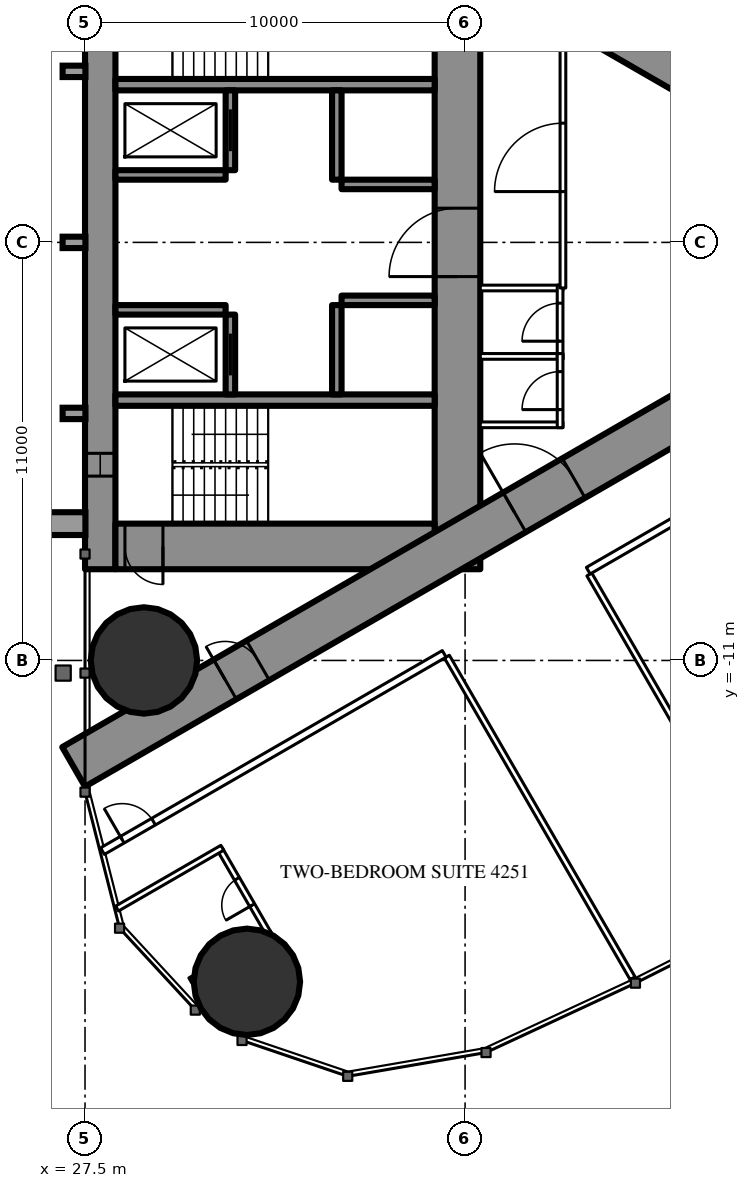
"""IFC4 building model, lengths in metres.
Left out: names, types, materials, properties, quantities, classifications, styles, units other than length and angle.
Written with IfcOpenShell. Run it as: python <this file> out.ifc"""

import sys

from ifc_helpers import new_model, si_unit, direction, frame, frame_2d, origin, origin_2d, place, context, subcontext, project, spatial, rectangle, circle, extrude, element, fill, save


model = new_model("IFC4")
c1 = context("Model", 3, precision=1e-05, world=origin(), true_north=direction((0.0, 1.0)))
c2 = subcontext(c1, "Body", "Model", "MODEL_VIEW")
j1 = project(units=[si_unit("LENGTHUNIT", "METRE"), si_unit("PLANEANGLEUNIT", "RADIAN")], contexts=[c1])
p1 = place(None, origin())
s1 = spatial("IfcSite", under=j1, at=p1, CompositionType="ELEMENT")
p2 = place(p1, origin())
s2 = spatial("IfcBuilding", under=s1, at=p2, CompositionType="ELEMENT")
p3 = place(p2, frame((0.0, 0.0, 159.8)))
s3 = spatial("IfcBuildingStorey", under=s2, at=p3, CompositionType="ELEMENT", Elevation=159.8)
for number, where, z_axis, x_axis in (
    (1, (31.76, -19.456, 0.0), (0.0, 0.0, 1.0), (1.0, 0.0, 0.0)),
    (2, (29.05, -11.0, 0.0), (0.0, 0.0, 1.0), (1.0, 0.0, 0.0)),
):
    element("IfcColumn", number, at=place(p3, frame(where, z_axis=z_axis, x_axis=x_axis)), inside=s3, PredefinedType="COLUMN", context=c2, shape_type="SweptSolid", body=[
        extrude(circle(Radius=1.4, at=origin_2d()), origin(), (0.0, 0.0, 1.0), 3.5),
    ])
p4 = place(p3, frame((27.9, -8.6, 0.0), z_axis=(0.0, 0.0, 1.0), x_axis=(0.0, 1.0, 0.0)))
e3 = element("IfcWall", 3, at=p4, inside=s3, PredefinedType="SHEAR", context=c2, shape_type="SweptSolid", body=[
    extrude(rectangle(XDim=17.2, YDim=0.8, at=frame_2d((8.6, 0.0))), origin(), (0.0, 0.0, 1.0), 3.5),
])
p5 = place(p4, frame((2.45, 0.0, 0.6)))
e4 = element("IfcOpeningElement", 4, at=p5, cuts=e3, PredefinedType="OPENING", context=c2, shape_type="SweptSolid", body=[
    extrude(rectangle(XDim=0.6, YDim=2.1, at=frame_2d((0.3, 1.05))), frame((0.0, 0.41, 0.0), z_axis=(0.0, -1.0, 0.0), x_axis=(1.0, 0.0, 0.0)), (0.0, 0.0, 1.0), 0.82),
])
p6 = place(p4, frame((14.15, 0.0, 0.6)))
e5 = element("IfcOpeningElement", 5, at=p6, cuts=e3, PredefinedType="OPENING", context=c2, shape_type="SweptSolid", body=[
    extrude(rectangle(XDim=0.6, YDim=2.1, at=frame_2d((0.3, 1.05))), frame((0.0, 0.41, 0.0), z_axis=(0.0, -1.0, 0.0), x_axis=(1.0, 0.0, 0.0)), (0.0, 0.0, 1.0), 0.82),
])
p7 = place(p3, frame((37.3, -8.6, 0.0), z_axis=(0.0, 0.0, 1.0), x_axis=(0.0, 1.0, 0.0)))
e6 = element("IfcWall", 6, at=p7, inside=s3, PredefinedType="SHEAR", context=c2, shape_type="SweptSolid", body=[
    extrude(rectangle(XDim=17.2, YDim=1.2, at=frame_2d((8.6, 0.0))), origin(), (0.0, 0.0, 1.0), 3.5),
])
p8 = place(p7, frame((7.7, 0.0, 0.0)))
e7 = element("IfcOpeningElement", 7, at=p8, cuts=e6, PredefinedType="OPENING", context=c2, shape_type="SweptSolid", body=[
    extrude(rectangle(XDim=1.8, YDim=2.2, at=frame_2d((0.9, 1.1))), frame((0.0, 0.61, 0.0), z_axis=(0.0, -1.0, 0.0), x_axis=(1.0, 0.0, 0.0)), (0.0, 0.0, 1.0), 1.22),
])
p9 = place(p3, frame((28.3, -8.0, 0.0), z_axis=(0.0, 0.0, 1.0), x_axis=(1.0, 0.0, 0.0)))
e8 = element("IfcWall", 8, at=p9, inside=s3, PredefinedType="SHEAR", context=c2, shape_type="SweptSolid", body=[
    extrude(rectangle(XDim=8.4, YDim=1.2, at=frame_2d((4.2, 0.0))), origin(), (0.0, 0.0, 1.0), 3.5),
])
p10 = place(p9, frame((0.25, 0.0, 0.0)))
e9 = element("IfcOpeningElement", 9, at=p10, cuts=e8, PredefinedType="OPENING", context=c2, shape_type="SweptSolid", body=[
    extrude(rectangle(XDim=1.0, YDim=2.2, at=frame_2d((0.5, 1.1))), frame((0.0, 0.61, 0.0), z_axis=(0.0, -1.0, 0.0), x_axis=(1.0, 0.0, 0.0)), (0.0, 0.0, 1.0), 1.22),
])
for number, where, z_axis, x_axis in (
    (10, (28.3, -4.15, 0.0), (0.0, 0.0, 1.0), (1.0, 0.0, 0.0)),
    (11, (28.3, 4.15, 0.0), (0.0, 0.0, 1.0), (1.0, 0.0, 0.0)),
):
    element("IfcWall", number, at=place(p3, frame(where, z_axis=z_axis, x_axis=x_axis)), inside=s3, PredefinedType="SHEAR", context=c2, shape_type="SweptSolid", body=[
        extrude(rectangle(XDim=8.4, YDim=0.3, at=frame_2d((4.2, 0.0))), origin(), (0.0, 0.0, 1.0), 3.5),
    ])
p11 = place(p3, frame((31.325, -4.0, 0.0), z_axis=(0.0, 0.0, 1.0), x_axis=(0.0, 1.0, 0.0)))
e12 = element("IfcWall", 12, at=p11, inside=s3, PredefinedType="SHEAR", context=c2, shape_type="SweptSolid", body=[
    extrude(rectangle(XDim=2.1, YDim=0.25, at=frame_2d((1.05, 0.0))), origin(), (0.0, 0.0, 1.0), 3.5),
])
p12 = place(p11, frame((0.5, 0.0, 0.0)))
e13 = element("IfcOpeningElement", 13, at=p12, cuts=e12, PredefinedType="OPENING", context=c2, shape_type="SweptSolid", body=[
    extrude(rectangle(XDim=1.1, YDim=2.2, at=frame_2d((0.55, 1.1))), frame((0.0, 0.135, 0.0), z_axis=(0.0, -1.0, 0.0), x_axis=(1.0, 0.0, 0.0)), (0.0, 0.0, 1.0), 0.27),
])
p13 = place(p3, frame((34.125, -4.0, 0.0), z_axis=(0.0, 0.0, 1.0), x_axis=(0.0, 1.0, 0.0)))
e14 = element("IfcWall", 14, at=p13, inside=s3, PredefinedType="SHEAR", context=c2, shape_type="SweptSolid", body=[
    extrude(rectangle(XDim=2.35, YDim=0.25, at=frame_2d((1.175, 0.0))), origin(), (0.0, 0.0, 1.0), 3.5),
])
p14 = place(p3, frame((28.3, -1.775, 0.0), z_axis=(0.0, 0.0, 1.0), x_axis=(1.0, 0.0, 0.0)))
e15 = element("IfcWall", 15, at=p14, inside=s3, PredefinedType="SHEAR", context=c2, shape_type="SweptSolid", body=[
    extrude(rectangle(XDim=2.9, YDim=0.25, at=frame_2d((1.45, 0.0))), origin(), (0.0, 0.0, 1.0), 3.5),
])
p15 = place(p3, frame((34.25, -1.525, 0.0), z_axis=(0.0, 0.0, 1.0), x_axis=(1.0, 0.0, 0.0)))
e16 = element("IfcWall", 16, at=p15, inside=s3, PredefinedType="SHEAR", context=c2, shape_type="SweptSolid", body=[
    extrude(rectangle(XDim=2.45, YDim=0.25, at=frame_2d((1.225, 0.0))), origin(), (0.0, 0.0, 1.0), 3.5),
])
p16 = place(p3, frame((31.325, 1.9, 0.0), z_axis=(0.0, 0.0, 1.0), x_axis=(0.0, 1.0, 0.0)))
e17 = element("IfcWall", 17, at=p16, inside=s3, PredefinedType="SHEAR", context=c2, shape_type="SweptSolid", body=[
    extrude(rectangle(XDim=2.1, YDim=0.25, at=frame_2d((1.05, 0.0))), origin(), (0.0, 0.0, 1.0), 3.5),
])
p17 = place(p16, frame((0.5, 0.0, 0.0)))
e18 = element("IfcOpeningElement", 18, at=p17, cuts=e17, PredefinedType="OPENING", context=c2, shape_type="SweptSolid", body=[
    extrude(rectangle(XDim=1.1, YDim=2.2, at=frame_2d((0.55, 1.1))), frame((0.0, 0.135, 0.0), z_axis=(0.0, -1.0, 0.0), x_axis=(1.0, 0.0, 0.0)), (0.0, 0.0, 1.0), 0.27),
])
p18 = place(p3, frame((34.125, 1.65, 0.0), z_axis=(0.0, 0.0, 1.0), x_axis=(0.0, 1.0, 0.0)))
e19 = element("IfcWall", 19, at=p18, inside=s3, PredefinedType="SHEAR", context=c2, shape_type="SweptSolid", body=[
    extrude(rectangle(XDim=2.35, YDim=0.25, at=frame_2d((1.175, 0.0))), origin(), (0.0, 0.0, 1.0), 3.5),
])
p19 = place(p3, frame((28.3, 1.775, 0.0), z_axis=(0.0, 0.0, 1.0), x_axis=(1.0, 0.0, 0.0)))
e20 = element("IfcWall", 20, at=p19, inside=s3, PredefinedType="SHEAR", context=c2, shape_type="SweptSolid", body=[
    extrude(rectangle(XDim=2.9, YDim=0.25, at=frame_2d((1.45, 0.0))), origin(), (0.0, 0.0, 1.0), 3.5),
])
p20 = place(p3, frame((34.25, 1.525, 0.0), z_axis=(0.0, 0.0, 1.0), x_axis=(1.0, 0.0, 0.0)))
e21 = element("IfcWall", 21, at=p20, inside=s3, PredefinedType="SHEAR", context=c2, shape_type="SweptSolid", body=[
    extrude(rectangle(XDim=2.45, YDim=0.25, at=frame_2d((1.225, 0.0))), origin(), (0.0, 0.0, 1.0), 3.5),
])
p21 = place(p3, frame((27.2, -13.8, 0.0), z_axis=(0.0, 0.0, 1.0), x_axis=(0.866027159892, 0.499996958321, 0.0)))
e22 = element("IfcWall", 22, at=p21, inside=s3, PredefinedType="SHEAR", context=c2, shape_type="SweptSolid", body=[
    extrude(rectangle(XDim=27.947, YDim=1.2, at=frame_2d((13.973, 0.0))), origin(), (0.0, 0.0, 1.0), 3.5),
])
p22 = place(p21, frame((4.6, 0.0, 0.0)))
e23 = element("IfcOpeningElement", 23, at=p22, cuts=e22, PredefinedType="OPENING", context=c2, shape_type="SweptSolid", body=[
    extrude(rectangle(XDim=1.0, YDim=2.2, at=frame_2d((0.5, 1.1))), frame((0.0, 0.61, 0.0), z_axis=(0.0, -1.0, 0.0), x_axis=(1.0, 0.0, 0.0)), (0.0, 0.0, 1.0), 1.22),
])
p23 = place(p21, frame((13.395, 0.0, 0.0)))
e24 = element("IfcOpeningElement", 24, at=p23, cuts=e22, PredefinedType="OPENING", context=c2, shape_type="SweptSolid", body=[
    extrude(rectangle(XDim=1.8, YDim=2.2, at=frame_2d((0.9, 1.1))), frame((0.0, 0.61, 0.0), z_axis=(0.0, -1.0, 0.0), x_axis=(1.0, 0.0, 0.0)), (0.0, 0.0, 1.0), 1.22),
])
p24 = place(p3, frame((27.2, 13.8, 0.0), z_axis=(0.0, 0.0, 1.0), x_axis=(0.866024515034, -0.500001539357, 0.0)))
e25 = element("IfcWall", 25, at=p24, inside=s3, PredefinedType="SHEAR", context=c2, shape_type="SweptSolid", body=[
    extrude(rectangle(XDim=26.907, YDim=1.2, at=frame_2d((13.454, 0.0))), origin(), (0.0, 0.0, 1.0), 3.5),
])
p25 = place(p24, frame((4.6, 0.0, 0.0)))
e26 = element("IfcOpeningElement", 26, at=p25, cuts=e25, PredefinedType="OPENING", context=c2, shape_type="SweptSolid", body=[
    extrude(rectangle(XDim=1.0, YDim=2.2, at=frame_2d((0.5, 1.1))), frame((0.0, 0.61, 0.0), z_axis=(0.0, -1.0, 0.0), x_axis=(1.0, 0.0, 0.0)), (0.0, 0.0, 1.0), 1.22),
])
p26 = place(p24, frame((13.395, 0.0, 0.0)))
e27 = element("IfcOpeningElement", 27, at=p26, cuts=e25, PredefinedType="OPENING", context=c2, shape_type="SweptSolid", body=[
    extrude(rectangle(XDim=1.8, YDim=2.2, at=frame_2d((0.9, 1.1))), frame((0.0, 0.61, 0.0), z_axis=(0.0, -1.0, 0.0), x_axis=(1.0, 0.0, 0.0)), (0.0, 0.0, 1.0), 1.22),
])
p27 = place(p3, frame((37.022, -10.9, 0.0), z_axis=(0.0, 0.0, 1.0), x_axis=(0.499998620953, -0.866026199976, 0.0)))
e28 = element("IfcWall", 28, at=p27, inside=s3, PredefinedType="PARTITIONING", context=c2, shape_type="SweptSolid", body=[
    extrude(rectangle(XDim=9.77, YDim=0.15, at=frame_2d((4.885, 0.0))), origin(), (0.0, 0.0, 1.0), 3.25),
])
p28 = place(p3, frame((40.769, -8.737, 0.0), z_axis=(0.0, 0.0, 1.0), x_axis=(0.500013115284, -0.866017831539, 0.0)))
e29 = element("IfcWall", 29, at=p28, inside=s3, PredefinedType="PARTITIONING", context=c2, shape_type="SweptSolid", body=[
    extrude(rectangle(XDim=7.198, YDim=0.15, at=frame_2d((3.599, 0.0))), origin(), (0.0, 0.0, 1.0), 2.3),
])
p29 = place(p3, frame((27.959, -16.017, 0.0), z_axis=(0.0, 0.0, 1.0), x_axis=(0.866026201739, 0.499998617899, 0.0)))
e30 = element("IfcWall", 30, at=p29, inside=s3, PredefinedType="PARTITIONING", context=c2, shape_type="SweptSolid", body=[
    extrude(rectangle(XDim=10.382, YDim=0.2, at=frame_2d((5.191, 0.0))), origin(), (0.0, 0.0, 1.0), 3.25),
])
p30 = place(p29, frame((0.6, 0.0, 0.0)))
e31 = element("IfcOpeningElement", 31, at=p30, cuts=e30, PredefinedType="OPENING", context=c2, shape_type="SweptSolid", body=[
    extrude(rectangle(XDim=0.95, YDim=2.2, at=frame_2d((0.475, 1.1))), frame((0.0, 0.11, 0.0), z_axis=(0.0, -1.0, 0.0), x_axis=(1.0, 0.0, 0.0)), (0.0, 0.0, 1.0), 0.22),
])
p31 = place(p3, frame((40.741, -8.638, 0.0), z_axis=(0.0, 0.0, 1.0), x_axis=(0.866022967338, 0.500004220025, 0.0)))
e32 = element("IfcWall", 32, at=p31, inside=s3, PredefinedType="PARTITIONING", context=c2, shape_type="SweptSolid", body=[
    extrude(rectangle(XDim=17.276, YDim=0.2, at=frame_2d((8.638, 0.0))), origin(), (0.0, 0.0, 1.0), 3.25),
])
p32 = place(p31, frame((7.316, 0.0, 0.0)))
e33 = element("IfcOpeningElement", 33, at=p32, cuts=e32, PredefinedType="OPENING", context=c2, shape_type="SweptSolid", body=[
    extrude(rectangle(XDim=0.95, YDim=2.2, at=frame_2d((0.475, 1.1))), frame((0.0, 0.11, 0.0), z_axis=(0.0, -1.0, 0.0), x_axis=(1.0, 0.0, 0.0)), (0.0, 0.0, 1.0), 0.22),
])
p33 = place(p31, frame((11.366, 0.0, 0.0)))
e34 = element("IfcOpeningElement", 34, at=p33, cuts=e32, PredefinedType="OPENING", context=c2, shape_type="SweptSolid", body=[
    extrude(rectangle(XDim=0.95, YDim=2.2, at=frame_2d((0.475, 1.1))), frame((0.0, 0.11, 0.0), z_axis=(0.0, -1.0, 0.0), x_axis=(1.0, 0.0, 0.0)), (0.0, 0.0, 1.0), 0.22),
])
p34 = place(p31, frame((13.347, 0.0, 0.0)))
e35 = element("IfcOpeningElement", 35, at=p34, cuts=e32, PredefinedType="OPENING", context=c2, shape_type="SweptSolid", body=[
    extrude(rectangle(XDim=0.95, YDim=2.2, at=frame_2d((0.475, 1.1))), frame((0.0, 0.11, 0.0), z_axis=(0.0, -1.0, 0.0), x_axis=(1.0, 0.0, 0.0)), (0.0, 0.0, 1.0), 0.22),
])
p35 = place(p3, frame((30.269, -19.418, 0.0), z_axis=(0.0, 0.0, 1.0), x_axis=(0.866006523861, 0.500032699561, 0.0)))
e36 = element("IfcWall", 36, at=p35, inside=s3, PredefinedType="PARTITIONING", context=c2, shape_type="SweptSolid", body=[
    extrude(rectangle(XDim=2.475, YDim=0.15, at=frame_2d((1.237, 0.0))), origin(), (0.0, 0.0, 1.0), 3.25),
])
p36 = place(p3, frame((31.048, -15.966, 0.0), z_axis=(0.0, 0.0, 1.0), x_axis=(0.499936506574, -0.866062058628, 0.0)))
e37 = element("IfcWall", 37, at=p36, inside=s3, PredefinedType="PARTITIONING", context=c2, shape_type="SweptSolid", body=[
    extrude(rectangle(XDim=2.6, YDim=0.15, at=frame_2d((1.3, 0.0))), origin(), (0.0, 0.0, 1.0), 2.3),
])
p37 = place(p36, frame((0.9, 0.0, 0.0)))
e38 = element("IfcOpeningElement", 38, at=p37, cuts=e37, PredefinedType="OPENING", context=c2, shape_type="SweptSolid", body=[
    extrude(rectangle(XDim=0.8, YDim=2.2, at=frame_2d((0.4, 1.1))), frame((0.0, 0.085, 0.0), z_axis=(0.0, -1.0, 0.0), x_axis=(1.0, 0.0, 0.0)), (0.0, 0.0, 1.0), 0.17),
])
p38 = place(p3, frame((28.343, -17.528, 0.0), z_axis=(0.0, 0.0, 1.0), x_axis=(0.86600760081, 0.500030834389, 0.0)))
e39 = element("IfcWall", 39, at=p38, inside=s3, PredefinedType="PARTITIONING", context=c2, shape_type="SweptSolid", body=[
    extrude(rectangle(XDim=3.198, YDim=0.15, at=frame_2d((1.599, 0.0))), origin(), (0.0, 0.0, 1.0), 3.25),
])
for number, where, z_axis, x_axis in (
    (40, (37.9, -1.2, 0.0), (0.0, 0.0, 1.0), (1.0, 0.0, 0.0)),
    (41, (37.9, -3.0, 0.0), (0.0, 0.0, 1.0), (1.0, 0.0, 0.0)),
    (42, (37.9, -4.8, 0.0), (0.0, 0.0, 1.0), (1.0, 0.0, 0.0)),
):
    element("IfcWall", number, at=place(p3, frame(where, z_axis=z_axis, x_axis=x_axis)), inside=s3, PredefinedType="PARTITIONING", context=c2, shape_type="SweptSolid", body=[
        extrude(rectangle(XDim=2.175, YDim=0.15, at=frame_2d((1.087, 0.0))), origin(), (0.0, 0.0, 1.0), 3.25),
    ])
p39 = place(p3, frame((40.0, -3.075, 0.0), z_axis=(0.0, 0.0, 1.0), x_axis=(0.0, 1.0, 0.0)))
e43 = element("IfcWall", 43, at=p39, inside=s3, PredefinedType="PARTITIONING", context=c2, shape_type="SweptSolid", body=[
    extrude(rectangle(XDim=1.95, YDim=0.15, at=frame_2d((0.975, 0.0))), origin(), (0.0, 0.0, 1.0), 3.25),
])
p40 = place(p39, frame((0.475, 0.0, 0.0)))
e44 = element("IfcOpeningElement", 44, at=p40, cuts=e43, PredefinedType="OPENING", context=c2, shape_type="SweptSolid", body=[
    extrude(rectangle(XDim=1.0, YDim=2.2, at=frame_2d((0.5, 1.1))), frame((0.0, 0.085, 0.0), z_axis=(0.0, -1.0, 0.0), x_axis=(1.0, 0.0, 0.0)), (0.0, 0.0, 1.0), 0.17),
])
p41 = place(p3, frame((40.0, -4.875, 0.0), z_axis=(0.0, 0.0, 1.0), x_axis=(0.0, 1.0, 0.0)))
e45 = element("IfcWall", 45, at=p41, inside=s3, PredefinedType="PARTITIONING", context=c2, shape_type="SweptSolid", body=[
    extrude(rectangle(XDim=1.95, YDim=0.15, at=frame_2d((0.975, 0.0))), origin(), (0.0, 0.0, 1.0), 3.25),
])
p42 = place(p41, frame((0.475, 0.0, 0.0)))
e46 = element("IfcOpeningElement", 46, at=p42, cuts=e45, PredefinedType="OPENING", context=c2, shape_type="SweptSolid", body=[
    extrude(rectangle(XDim=1.0, YDim=2.2, at=frame_2d((0.5, 1.1))), frame((0.0, 0.085, 0.0), z_axis=(0.0, -1.0, 0.0), x_axis=(1.0, 0.0, 0.0)), (0.0, 0.0, 1.0), 0.17),
])
p43 = place(p3, frame((40.075, -1.2, 0.0), z_axis=(0.0, 0.0, 1.0), x_axis=(0.0, 1.0, 0.0)))
e47 = element("IfcWall", 47, at=p43, inside=s3, PredefinedType="PARTITIONING", context=c2, shape_type="SweptSolid", body=[
    extrude(rectangle(XDim=6.874, YDim=0.15, at=frame_2d((3.437, 0.0))), origin(), (0.0, 0.0, 1.0), 3.25),
])
p44 = place(p43, frame((2.537, 0.0, 0.0)))
e48 = element("IfcOpeningElement", 48, at=p44, cuts=e47, PredefinedType="OPENING", context=c2, shape_type="SweptSolid", body=[
    extrude(rectangle(XDim=1.8, YDim=2.2, at=frame_2d((0.9, 1.1))), frame((0.0, 0.085, 0.0), z_axis=(0.0, -1.0, 0.0), x_axis=(1.0, 0.0, 0.0)), (0.0, 0.0, 1.0), 0.17),
])
p45 = place(p37, origin())
e49 = element("IfcDoor", 49, at=p45, inside=s3, OperationType="SINGLE_SWING_RIGHT", PredefinedType="DOOR", context=c2, shape_type="SweptSolid", body=[
    extrude(rectangle(XDim=0.8, YDim=2.2, at=frame_2d((0.4, 1.1))), frame((0.0, 0.025, 0.0), z_axis=(0.0, -1.0, 0.0), x_axis=(1.0, 0.0, 0.0)), (0.0, 0.0, 1.0), 0.05),
])
fill(e38, e49)
p46 = place(p30, origin())
e50 = element("IfcDoor", 50, at=p46, inside=s3, OperationType="SINGLE_SWING_LEFT", PredefinedType="DOOR", context=c2, shape_type="SweptSolid", body=[
    extrude(rectangle(XDim=0.95, YDim=2.2, at=frame_2d((0.475, 1.1))), frame((0.0, 0.025, 0.0), z_axis=(0.0, -1.0, 0.0), x_axis=(1.0, 0.0, 0.0)), (0.0, 0.0, 1.0), 0.05),
])
fill(e31, e50)
p47 = place(p40, origin())
e51 = element("IfcDoor", 51, at=p47, inside=s3, OperationType="SINGLE_SWING_LEFT", PredefinedType="DOOR", context=c2, shape_type="SweptSolid", body=[
    extrude(rectangle(XDim=1.0, YDim=2.2, at=frame_2d((0.5, 1.1))), frame((0.0, 0.025, 0.0), z_axis=(0.0, -1.0, 0.0), x_axis=(1.0, 0.0, 0.0)), (0.0, 0.0, 1.0), 0.05),
])
fill(e44, e51)
p48 = place(p42, origin())
e52 = element("IfcDoor", 52, at=p48, inside=s3, OperationType="SINGLE_SWING_LEFT", PredefinedType="DOOR", context=c2, shape_type="SweptSolid", body=[
    extrude(rectangle(XDim=1.0, YDim=2.2, at=frame_2d((0.5, 1.1))), frame((0.0, 0.025, 0.0), z_axis=(0.0, -1.0, 0.0), x_axis=(1.0, 0.0, 0.0)), (0.0, 0.0, 1.0), 0.05),
])
fill(e46, e52)
p49 = place(p44, origin())
e53 = element("IfcDoor", 53, at=p49, inside=s3, OperationType="DOUBLE_DOOR_SINGLE_SWING", PredefinedType="DOOR", context=c2, shape_type="SweptSolid", body=[
    extrude(rectangle(XDim=1.8, YDim=2.2, at=frame_2d((0.9, 1.1))), frame((0.0, 0.025, 0.0), z_axis=(0.0, -1.0, 0.0), x_axis=(1.0, 0.0, 0.0)), (0.0, 0.0, 1.0), 0.05),
])
fill(e48, e53)
p50 = place(p22, origin())
e54 = element("IfcDoor", 54, at=p50, inside=s3, OperationType="SINGLE_SWING_LEFT", PredefinedType="DOOR", context=c2, shape_type="SweptSolid", body=[
    extrude(rectangle(XDim=1.0, YDim=2.2, at=frame_2d((0.5, 1.1))), frame((0.0, 0.025, 0.0), z_axis=(0.0, -1.0, 0.0), x_axis=(1.0, 0.0, 0.0)), (0.0, 0.0, 1.0), 0.05),
])
fill(e23, e54)
p51 = place(p23, origin())
e55 = element("IfcDoor", 55, at=p51, inside=s3, OperationType="DOUBLE_DOOR_SINGLE_SWING", PredefinedType="DOOR", context=c2, shape_type="SweptSolid", body=[
    extrude(rectangle(XDim=1.8, YDim=2.2, at=frame_2d((0.9, 1.1))), frame((0.0, 0.025, 0.0), z_axis=(0.0, -1.0, 0.0), x_axis=(1.0, 0.0, 0.0)), (0.0, 0.0, 1.0), 0.05),
])
fill(e24, e55)
p52 = place(p8, origin())
e56 = element("IfcDoor", 56, at=p52, inside=s3, OperationType="DOUBLE_DOOR_SINGLE_SWING", PredefinedType="DOOR", context=c2, shape_type="SweptSolid", body=[
    extrude(rectangle(XDim=1.8, YDim=2.2, at=frame_2d((0.9, 1.1))), frame((0.0, 0.025, 0.0), z_axis=(0.0, -1.0, 0.0), x_axis=(1.0, 0.0, 0.0)), (0.0, 0.0, 1.0), 0.05),
])
fill(e7, e56)
p53 = place(p10, origin())
e57 = element("IfcDoor", 57, at=p53, inside=s3, OperationType="SINGLE_SWING_RIGHT", PredefinedType="DOOR", context=c2, shape_type="SweptSolid", body=[
    extrude(rectangle(XDim=1.0, YDim=2.2, at=frame_2d((0.5, 1.1))), frame((0.0, 0.025, 0.0), z_axis=(0.0, -1.0, 0.0), x_axis=(1.0, 0.0, 0.0)), (0.0, 0.0, 1.0), 0.05),
])
fill(e9, e57)
p54 = place(p12, origin())
e58 = element("IfcDoor", 58, at=p54, inside=s3, OperationType="SLIDING_TO_LEFT", PredefinedType="USERDEFINED", context=c2, shape_type="SweptSolid", body=[
    extrude(rectangle(XDim=1.1, YDim=2.2, at=frame_2d((0.55, 1.1))), frame((0.0, 0.025, 0.0), z_axis=(0.0, -1.0, 0.0), x_axis=(1.0, 0.0, 0.0)), (0.0, 0.0, 1.0), 0.05),
])
fill(e13, e58)
p55 = place(p17, origin())
e59 = element("IfcDoor", 59, at=p55, inside=s3, OperationType="SLIDING_TO_LEFT", PredefinedType="USERDEFINED", context=c2, shape_type="SweptSolid", body=[
    extrude(rectangle(XDim=1.1, YDim=2.2, at=frame_2d((0.55, 1.1))), frame((0.0, 0.025, 0.0), z_axis=(0.0, -1.0, 0.0), x_axis=(1.0, 0.0, 0.0)), (0.0, 0.0, 1.0), 0.05),
])
fill(e18, e59)
p56 = place(p5, origin())
e60 = element("IfcWindow", 60, at=p56, inside=s3, PartitioningType="SINGLE_PANEL", PredefinedType="WINDOW", context=c2, shape_type="SweptSolid", body=[
    extrude(rectangle(XDim=0.6, YDim=2.1, at=frame_2d((0.3, 1.05))), frame((0.0, 0.03, 0.0), z_axis=(0.0, -1.0, 0.0), x_axis=(1.0, 0.0, 0.0)), (0.0, 0.0, 1.0), 0.06),
])
fill(e4, e60)
save(model, sys.argv[1])
